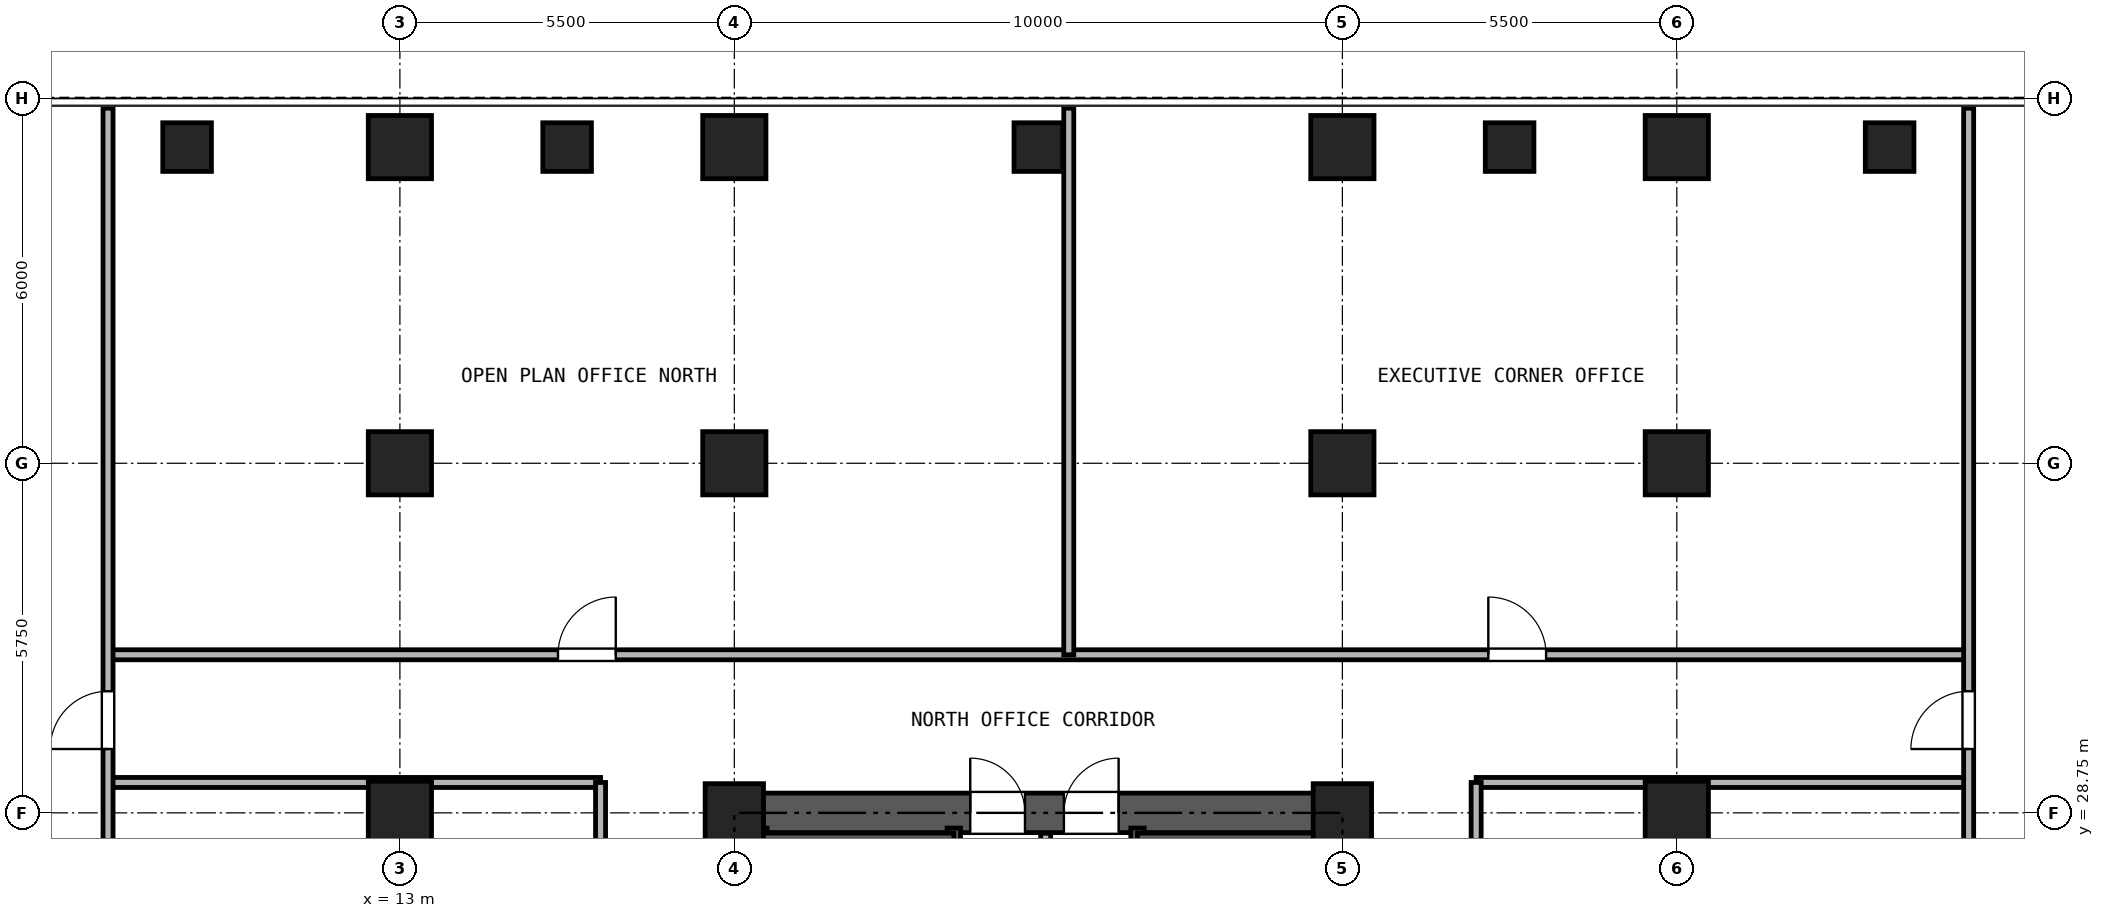
"""IFC4 building model, lengths in metres.
Left out: names, types, materials, properties, quantities, classifications, styles, units other than length and angle.
Written with IfcOpenShell. Run it as: python <this file> out.ifc"""

import sys

from ifc_helpers import new_model, si_unit, direction, frame, frame_2d, origin, origin_2d, place, context, subcontext, project, spatial, rectangle, hollow_rectangle, extrude, source, transform, mapped, element, fill, save


model = new_model("IFC4")
c1 = context("Model", 3, precision=1e-05, world=origin(), true_north=direction((0.0, 1.0)))
c2 = subcontext(c1, "Body", "Model", "MODEL_VIEW")
j1 = project(units=[si_unit("LENGTHUNIT", "METRE"), si_unit("PLANEANGLEUNIT", "RADIAN")], contexts=[c1])
p1 = place(None, origin())
s1 = spatial("IfcSite", under=j1, at=p1, CompositionType="ELEMENT")
p2 = place(p1, origin())
s2 = spatial("IfcBuilding", under=s1, at=p2, CompositionType="ELEMENT")
p3 = place(p2, frame((0.0, 0.0, 26.1)))
s3 = spatial("IfcBuildingStorey", under=s2, at=p3, CompositionType="ELEMENT", Elevation=26.1)
m1 = source(origin(), c2, "Body", "SweptSolid", [
    extrude(hollow_rectangle(XDim=1.04, YDim=1.04, WallThickness=0.065, at=origin_2d()), origin(), (0.0, 0.0, 1.0), 3.32),
])
for number, where, z_axis, x_axis in (
    (1, (13.0, 39.7, 0.0), (0.0, 0.0, 1.0), (1.0, 0.0, 0.0)),
    (2, (18.5, 39.7, 0.0), (0.0, 0.0, 1.0), (1.0, 0.0, 0.0)),
    (3, (28.5, 39.7, 0.0), (0.0, 0.0, 1.0), (1.0, 0.0, 0.0)),
    (4, (34.0, 39.7, 0.0), (0.0, 0.0, 1.0), (1.0, 0.0, 0.0)),
    (5, (13.0, 28.75, 0.0), (0.0, 0.0, 1.0), (1.0, 0.0, 0.0)),
    (6, (13.0, 34.5, 0.0), (0.0, 0.0, 1.0), (1.0, 0.0, 0.0)),
):
    element("IfcColumn", number, at=place(p3, frame(where, z_axis=z_axis, x_axis=x_axis)), inside=s3, PredefinedType="COLUMN", context=c2, shape_type="MappedRepresentation", body=[
        mapped(m1, transform((0.0, 0.0, 0.0), x_axis=(1.0, 0.0, 0.0), y_axis=(0.0, 1.0, 0.0), z_axis=(0.0, 0.0, 1.0), scale=1.0)),
    ])
m2 = source(origin(), c2, "Body", "SweptSolid", [
    extrude(hollow_rectangle(XDim=0.96, YDim=0.96, WallThickness=0.06, at=origin_2d()), origin(), (0.0, 0.0, 1.0), 3.32),
])
p4 = place(p3, frame((18.5, 28.75, 0.0), z_axis=(0.0, 0.0, 1.0), x_axis=(1.0, 0.0, 0.0)))
e7 = element("IfcColumn", 7, at=p4, inside=s3, PredefinedType="COLUMN", context=c2, shape_type="MappedRepresentation", body=[
    mapped(m2, transform((0.0, 0.0, 0.0), x_axis=(1.0, 0.0, 0.0), y_axis=(0.0, 1.0, 0.0), z_axis=(0.0, 0.0, 1.0), scale=1.0)),
])
p5 = place(p3, frame((18.5, 34.5, 0.0), z_axis=(0.0, 0.0, 1.0), x_axis=(1.0, 0.0, 0.0)))
e8 = element("IfcColumn", 8, at=p5, inside=s3, PredefinedType="COLUMN", context=c2, shape_type="MappedRepresentation", body=[
    mapped(m1, transform((0.0, 0.0, 0.0), x_axis=(1.0, 0.0, 0.0), y_axis=(0.0, 1.0, 0.0), z_axis=(0.0, 0.0, 1.0), scale=1.0)),
])
p6 = place(p3, frame((28.5, 28.75, 0.0), z_axis=(0.0, 0.0, 1.0), x_axis=(1.0, 0.0, 0.0)))
e9 = element("IfcColumn", 9, at=p6, inside=s3, PredefinedType="COLUMN", context=c2, shape_type="MappedRepresentation", body=[
    mapped(m2, transform((0.0, 0.0, 0.0), x_axis=(1.0, 0.0, 0.0), y_axis=(0.0, 1.0, 0.0), z_axis=(0.0, 0.0, 1.0), scale=1.0)),
])
for number, where, z_axis, x_axis in (
    (10, (28.5, 34.5, 0.0), (0.0, 0.0, 1.0), (1.0, 0.0, 0.0)),
    (11, (34.0, 28.75, 0.0), (0.0, 0.0, 1.0), (1.0, 0.0, 0.0)),
    (12, (34.0, 34.5, 0.0), (0.0, 0.0, 1.0), (1.0, 0.0, 0.0)),
):
    element("IfcColumn", number, at=place(p3, frame(where, z_axis=z_axis, x_axis=x_axis)), inside=s3, PredefinedType="COLUMN", context=c2, shape_type="MappedRepresentation", body=[
        mapped(m1, transform((0.0, 0.0, 0.0), x_axis=(1.0, 0.0, 0.0), y_axis=(0.0, 1.0, 0.0), z_axis=(0.0, 0.0, 1.0), scale=1.0)),
    ])
m3 = source(origin(), c2, "Body", "SweptSolid", [
    extrude(hollow_rectangle(XDim=0.8, YDim=0.8, WallThickness=0.045, at=origin_2d()), origin(), (0.0, 0.0, 1.0), 3.32),
])
for number, where, z_axis, x_axis in (
    (13, (9.5, 39.7, 0.0), (0.0, 0.0, 1.0), (1.0, 0.0, 0.0)),
    (14, (15.75, 39.7, 0.0), (0.0, 0.0, 1.0), (1.0, 0.0, 0.0)),
    (15, (23.5, 39.7, 0.0), (0.0, 0.0, 1.0), (1.0, 0.0, 0.0)),
    (16, (31.25, 39.7, 0.0), (0.0, 0.0, 1.0), (1.0, 0.0, 0.0)),
    (17, (37.5, 39.7, 0.0), (0.0, 0.0, 1.0), (1.0, 0.0, 0.0)),
):
    element("IfcColumn", number, at=place(p3, frame(where, z_axis=z_axis, x_axis=x_axis)), inside=s3, PredefinedType="COLUMN", context=c2, shape_type="MappedRepresentation", body=[
        mapped(m3, transform((0.0, 0.0, 0.0), x_axis=(1.0, 0.0, 0.0), y_axis=(0.0, 1.0, 0.0), z_axis=(0.0, 0.0, 1.0), scale=1.0)),
    ])
p7 = place(p3, frame((18.175, 28.75, 0.0), z_axis=(0.0, 0.0, 1.0), x_axis=(1.0, 0.0, 0.0)))
e18 = element("IfcWall", 18, at=p7, inside=s3, PredefinedType="SHEAR", context=c2, shape_type="SweptSolid", body=[
    extrude(rectangle(XDim=10.65, YDim=0.65, at=frame_2d((5.325, 0.0))), origin(), (0.0, 0.0, 1.0), 3.32),
])
p8 = place(p7, frame((4.205, 0.0, 0.0)))
e19 = element("IfcOpeningElement", 19, at=p8, cuts=e18, PredefinedType="OPENING", context=c2, shape_type="SweptSolid", body=[
    extrude(rectangle(XDim=0.9, YDim=2.05, at=frame_2d((0.45, 1.025))), frame((0.0, 0.335, 0.0), z_axis=(0.0, -1.0, 0.0), x_axis=(1.0, 0.0, 0.0)), (0.0, 0.0, 1.0), 0.67),
])
p9 = place(p7, frame((5.745, 0.0, 0.0)))
e20 = element("IfcOpeningElement", 20, at=p9, cuts=e18, PredefinedType="OPENING", context=c2, shape_type="SweptSolid", body=[
    extrude(rectangle(XDim=0.9, YDim=2.05, at=frame_2d((0.45, 1.025))), frame((0.0, 0.335, 0.0), z_axis=(0.0, -1.0, 0.0), x_axis=(1.0, 0.0, 0.0)), (0.0, 0.0, 1.0), 0.67),
])
p10 = place(p3, frame((18.5, 11.825, 0.0), z_axis=(0.0, 0.0, 1.0), x_axis=(0.0, 1.0, 0.0)))
e21 = element("IfcWall", 21, at=p10, inside=s3, PredefinedType="SHEAR", context=c2, shape_type="SweptSolid", body=[
    extrude(rectangle(XDim=16.6, YDim=0.65, at=frame_2d((8.3, 0.0))), origin(), (0.0, 0.0, 1.0), 3.32),
])
p11 = place(p10, frame((7.325, 0.0, 0.0)))
e22 = element("IfcOpeningElement", 22, at=p11, cuts=e21, PredefinedType="OPENING", context=c2, shape_type="SweptSolid", body=[
    extrude(rectangle(XDim=1.15, YDim=2.2, at=frame_2d((0.575, 1.1))), frame((0.0, 0.335, 0.0), z_axis=(0.0, -1.0, 0.0), x_axis=(1.0, 0.0, 0.0)), (0.0, 0.0, 1.0), 0.67),
])
p12 = place(p3, frame((28.5, 11.825, 0.0), z_axis=(0.0, 0.0, 1.0), x_axis=(0.0, 1.0, 0.0)))
e23 = element("IfcWall", 23, at=p12, inside=s3, PredefinedType="SHEAR", context=c2, shape_type="SweptSolid", body=[
    extrude(rectangle(XDim=16.6, YDim=0.65, at=frame_2d((8.3, 0.0))), origin(), (0.0, 0.0, 1.0), 3.32),
])
p13 = place(p12, frame((7.325, 0.0, 0.0)))
e24 = element("IfcOpeningElement", 24, at=p13, cuts=e23, PredefinedType="OPENING", context=c2, shape_type="SweptSolid", body=[
    extrude(rectangle(XDim=1.15, YDim=2.2, at=frame_2d((0.575, 1.1))), frame((0.0, 0.335, 0.0), z_axis=(0.0, -1.0, 0.0), x_axis=(1.0, 0.0, 0.0)), (0.0, 0.0, 1.0), 0.67),
])
for number, where, z_axis, x_axis in (
    (25, (18.93, 21.39, 0.0), (0.0, 0.0, 1.0), (0.0, 1.0, 0.0)),
    (26, (22.11, 21.39, 0.0), (0.0, 0.0, 1.0), (0.0, 1.0, 0.0)),
    (27, (25.13, 21.39, 0.0), (0.0, 0.0, 1.0), (0.0, 1.0, 0.0)),
):
    element("IfcWall", number, at=place(p3, frame(where, z_axis=z_axis, x_axis=x_axis)), inside=s3, PredefinedType="SOLIDWALL", context=c2, shape_type="SweptSolid", body=[
        extrude(rectangle(XDim=7.11, YDim=0.22, at=frame_2d((3.555, 0.0))), origin(), (0.0, 0.0, 1.0), 3.32),
    ])
p14 = place(p3, frame((18.835, 28.335, 0.0), z_axis=(0.0, 0.0, 1.0), x_axis=(1.0, 0.0, 0.0)))
e28 = element("IfcWall", 28, at=p14, inside=s3, PredefinedType="PARTITIONING", context=c2, shape_type="SweptSolid", body=[
    extrude(rectangle(XDim=3.275, YDim=0.165, at=frame_2d((1.638, 0.0))), origin(), (0.0, 0.0, 1.0), 3.32),
])
p15 = place(p3, frame((25.13, 28.335, 0.0), z_axis=(0.0, 0.0, 1.0), x_axis=(1.0, 0.0, 0.0)))
e29 = element("IfcWall", 29, at=p15, inside=s3, PredefinedType="PARTITIONING", context=c2, shape_type="SweptSolid", body=[
    extrude(rectangle(XDim=3.035, YDim=0.165, at=frame_2d((1.518, 0.0))), origin(), (0.0, 0.0, 1.0), 3.32),
])
p16 = place(p3, frame((23.62, 24.4, 0.0), z_axis=(0.0, 0.0, 1.0), x_axis=(0.0, 1.0, 0.0)))
e30 = element("IfcWall", 30, at=p16, inside=s3, PredefinedType="PARTITIONING", context=c2, shape_type="SweptSolid", body=[
    extrude(rectangle(XDim=4.015, YDim=0.165, at=frame_2d((2.008, 0.0))), origin(), (0.0, 0.0, 1.0), 3.32),
])
p17 = place(p3, frame((8.2, 31.35, 0.0), z_axis=(0.0, 0.0, 1.0), x_axis=(1.0, 0.0, 0.0)))
e31 = element("IfcWall", 31, at=p17, inside=s3, PredefinedType="PARTITIONING", context=c2, shape_type="SweptSolid", body=[
    extrude(rectangle(XDim=30.6, YDim=0.165, at=frame_2d((15.3, 0.0))), origin(), (0.0, 0.0, 1.0), 3.32),
])
p18 = place(p17, frame((7.4, 0.0, 0.0)))
e32 = element("IfcOpeningElement", 32, at=p18, cuts=e31, PredefinedType="OPENING", context=c2, shape_type="SweptSolid", body=[
    extrude(rectangle(XDim=0.95, YDim=2.15, at=frame_2d((0.475, 1.075))), frame((0.0, 0.093, 0.0), z_axis=(0.0, -1.0, 0.0), x_axis=(1.0, 0.0, 0.0)), (0.0, 0.0, 1.0), 0.185),
])
p19 = place(p17, frame((22.7, 0.0, 0.0)))
e33 = element("IfcOpeningElement", 33, at=p19, cuts=e31, PredefinedType="OPENING", context=c2, shape_type="SweptSolid", body=[
    extrude(rectangle(XDim=0.95, YDim=2.15, at=frame_2d((0.475, 1.075))), frame((0.0, 0.093, 0.0), z_axis=(0.0, -1.0, 0.0), x_axis=(1.0, 0.0, 0.0)), (0.0, 0.0, 1.0), 0.185),
])
for number, where, z_axis, x_axis in (
    (34, (8.2, 29.25, 0.0), (0.0, 0.0, 1.0), (1.0, 0.0, 0.0)),
    (35, (30.7, 29.25, 0.0), (0.0, 0.0, 1.0), (1.0, 0.0, 0.0)),
):
    element("IfcWall", number, at=place(p3, frame(where, z_axis=z_axis, x_axis=x_axis)), inside=s3, PredefinedType="PARTITIONING", context=c2, shape_type="SweptSolid", body=[
        extrude(rectangle(XDim=8.1, YDim=0.165, at=frame_2d((4.05, 0.0))), origin(), (0.0, 0.0, 1.0), 3.32),
    ])
p20 = place(p3, frame((16.3, 10.9, 0.0), z_axis=(0.0, 0.0, 1.0), x_axis=(0.0, 1.0, 0.0)))
e36 = element("IfcWall", 36, at=p20, inside=s3, PredefinedType="PARTITIONING", context=c2, shape_type="SweptSolid", body=[
    extrude(rectangle(XDim=18.35, YDim=0.165, at=frame_2d((9.175, 0.0))), origin(), (0.0, 0.0, 1.0), 3.32),
])
p21 = place(p20, frame((5.44, 0.0, 0.0)))
e37 = element("IfcOpeningElement", 37, at=p21, cuts=e36, PredefinedType="OPENING", context=c2, shape_type="SweptSolid", body=[
    extrude(rectangle(XDim=0.95, YDim=2.15, at=frame_2d((0.475, 1.075))), frame((0.0, 0.093, 0.0), z_axis=(0.0, -1.0, 0.0), x_axis=(1.0, 0.0, 0.0)), (0.0, 0.0, 1.0), 0.185),
])
p22 = place(p20, frame((14.616, 0.0, 0.0)))
e38 = element("IfcOpeningElement", 38, at=p22, cuts=e36, PredefinedType="OPENING", context=c2, shape_type="SweptSolid", body=[
    extrude(rectangle(XDim=0.95, YDim=2.15, at=frame_2d((0.475, 1.075))), frame((0.0, 0.093, 0.0), z_axis=(0.0, -1.0, 0.0), x_axis=(1.0, 0.0, 0.0)), (0.0, 0.0, 1.0), 0.185),
])
p23 = place(p3, frame((30.7, 10.9, 0.0), z_axis=(0.0, 0.0, 1.0), x_axis=(0.0, 1.0, 0.0)))
e39 = element("IfcWall", 39, at=p23, inside=s3, PredefinedType="PARTITIONING", context=c2, shape_type="SweptSolid", body=[
    extrude(rectangle(XDim=18.35, YDim=0.165, at=frame_2d((9.175, 0.0))), origin(), (0.0, 0.0, 1.0), 3.32),
])
p24 = place(p23, frame((8.675, 0.0, 0.0)))
e40 = element("IfcOpeningElement", 40, at=p24, cuts=e39, PredefinedType="OPENING", context=c2, shape_type="SweptSolid", body=[
    extrude(rectangle(XDim=0.95, YDim=2.15, at=frame_2d((0.475, 1.075))), frame((0.0, 0.093, 0.0), z_axis=(0.0, -1.0, 0.0), x_axis=(1.0, 0.0, 0.0)), (0.0, 0.0, 1.0), 0.185),
])
p25 = place(p3, frame((8.2, 0.16, 0.0), z_axis=(0.0, 0.0, 1.0), x_axis=(0.0, 1.0, 0.0)))
e41 = element("IfcWall", 41, at=p25, inside=s3, PredefinedType="PARTITIONING", context=c2, shape_type="SweptSolid", body=[
    extrude(rectangle(XDim=40.18, YDim=0.165, at=frame_2d((20.09, 0.0))), origin(), (0.0, 0.0, 1.0), 3.32),
])
p26 = place(p25, frame((9.19, 0.0, 0.0)))
e42 = element("IfcOpeningElement", 42, at=p26, cuts=e41, PredefinedType="OPENING", context=c2, shape_type="SweptSolid", body=[
    extrude(rectangle(XDim=0.95, YDim=2.15, at=frame_2d((0.475, 1.075))), frame((0.0, 0.093, 0.0), z_axis=(0.0, -1.0, 0.0), x_axis=(1.0, 0.0, 0.0)), (0.0, 0.0, 1.0), 0.185),
])
p27 = place(p25, frame((29.64, 0.0, 0.0)))
e43 = element("IfcOpeningElement", 43, at=p27, cuts=e41, PredefinedType="OPENING", context=c2, shape_type="SweptSolid", body=[
    extrude(rectangle(XDim=0.95, YDim=2.15, at=frame_2d((0.475, 1.075))), frame((0.0, 0.093, 0.0), z_axis=(0.0, -1.0, 0.0), x_axis=(1.0, 0.0, 0.0)), (0.0, 0.0, 1.0), 0.185),
])
p28 = place(p3, frame((38.8, 0.16, 0.0), z_axis=(0.0, 0.0, 1.0), x_axis=(0.0, 1.0, 0.0)))
e44 = element("IfcWall", 44, at=p28, inside=s3, PredefinedType="PARTITIONING", context=c2, shape_type="SweptSolid", body=[
    extrude(rectangle(XDim=40.18, YDim=0.165, at=frame_2d((20.09, 0.0))), origin(), (0.0, 0.0, 1.0), 3.32),
])
p29 = place(p28, frame((9.19, 0.0, 0.0)))
e45 = element("IfcOpeningElement", 45, at=p29, cuts=e44, PredefinedType="OPENING", context=c2, shape_type="SweptSolid", body=[
    extrude(rectangle(XDim=0.95, YDim=2.15, at=frame_2d((0.475, 1.075))), frame((0.0, 0.093, 0.0), z_axis=(0.0, -1.0, 0.0), x_axis=(1.0, 0.0, 0.0)), (0.0, 0.0, 1.0), 0.185),
])
p30 = place(p28, frame((29.64, 0.0, 0.0)))
e46 = element("IfcOpeningElement", 46, at=p30, cuts=e44, PredefinedType="OPENING", context=c2, shape_type="SweptSolid", body=[
    extrude(rectangle(XDim=0.95, YDim=2.15, at=frame_2d((0.475, 1.075))), frame((0.0, 0.093, 0.0), z_axis=(0.0, -1.0, 0.0), x_axis=(1.0, 0.0, 0.0)), (0.0, 0.0, 1.0), 0.185),
])
p31 = place(p3, frame((24.0, 31.35, 0.0), z_axis=(0.0, 0.0, 1.0), x_axis=(0.0, 1.0, 0.0)))
e47 = element("IfcWall", 47, at=p31, inside=s3, PredefinedType="PARTITIONING", context=c2, shape_type="SweptSolid", body=[
    extrude(rectangle(XDim=8.99, YDim=0.165, at=frame_2d((4.495, 0.0))), origin(), (0.0, 0.0, 1.0), 3.32),
])
p32 = place(p8, origin())
e48 = element("IfcDoor", 48, at=p32, inside=s3, OperationType="SINGLE_SWING_LEFT", PredefinedType="DOOR", context=c2, shape_type="SweptSolid", body=[
    extrude(rectangle(XDim=0.9, YDim=2.05, at=frame_2d((0.45, 1.025))), frame((0.0, 0.025, 0.0), z_axis=(0.0, -1.0, 0.0), x_axis=(1.0, 0.0, 0.0)), (0.0, 0.0, 1.0), 0.05),
])
fill(e19, e48)
p33 = place(p9, origin())
e49 = element("IfcDoor", 49, at=p33, inside=s3, OperationType="SINGLE_SWING_RIGHT", PredefinedType="DOOR", context=c2, shape_type="SweptSolid", body=[
    extrude(rectangle(XDim=0.9, YDim=2.05, at=frame_2d((0.45, 1.025))), frame((0.0, 0.025, 0.0), z_axis=(0.0, -1.0, 0.0), x_axis=(1.0, 0.0, 0.0)), (0.0, 0.0, 1.0), 0.05),
])
fill(e20, e49)
p34 = place(p18, origin())
e50 = element("IfcDoor", 50, at=p34, inside=s3, OperationType="SINGLE_SWING_RIGHT", PredefinedType="DOOR", context=c2, shape_type="SweptSolid", body=[
    extrude(rectangle(XDim=0.95, YDim=2.15, at=frame_2d((0.475, 1.075))), frame((0.0, 0.025, 0.0), z_axis=(0.0, -1.0, 0.0), x_axis=(1.0, 0.0, 0.0)), (0.0, 0.0, 1.0), 0.05),
])
fill(e32, e50)
p35 = place(p19, origin())
e51 = element("IfcDoor", 51, at=p35, inside=s3, OperationType="SINGLE_SWING_LEFT", PredefinedType="DOOR", context=c2, shape_type="SweptSolid", body=[
    extrude(rectangle(XDim=0.95, YDim=2.15, at=frame_2d((0.475, 1.075))), frame((0.0, 0.025, 0.0), z_axis=(0.0, -1.0, 0.0), x_axis=(1.0, 0.0, 0.0)), (0.0, 0.0, 1.0), 0.05),
])
fill(e33, e51)
p36 = place(p27, frame((0.95, 0.0, 0.0), z_axis=(0.0, 0.0, 1.0), x_axis=(-1.0, 0.0, 0.0)))
e52 = element("IfcDoor", 52, at=p36, inside=s3, OperationType="SINGLE_SWING_LEFT", PredefinedType="DOOR", context=c2, shape_type="SweptSolid", body=[
    extrude(rectangle(XDim=0.95, YDim=2.15, at=frame_2d((0.475, 1.075))), frame((0.0, 0.025, 0.0), z_axis=(0.0, -1.0, 0.0), x_axis=(1.0, 0.0, 0.0)), (0.0, 0.0, 1.0), 0.05),
])
fill(e43, e52)
p37 = place(p30, origin())
e53 = element("IfcDoor", 53, at=p37, inside=s3, OperationType="SINGLE_SWING_LEFT", PredefinedType="DOOR", context=c2, shape_type="SweptSolid", body=[
    extrude(rectangle(XDim=0.95, YDim=2.15, at=frame_2d((0.475, 1.075))), frame((0.0, 0.025, 0.0), z_axis=(0.0, -1.0, 0.0), x_axis=(1.0, 0.0, 0.0)), (0.0, 0.0, 1.0), 0.05),
])
fill(e46, e53)
save(model, sys.argv[1])
